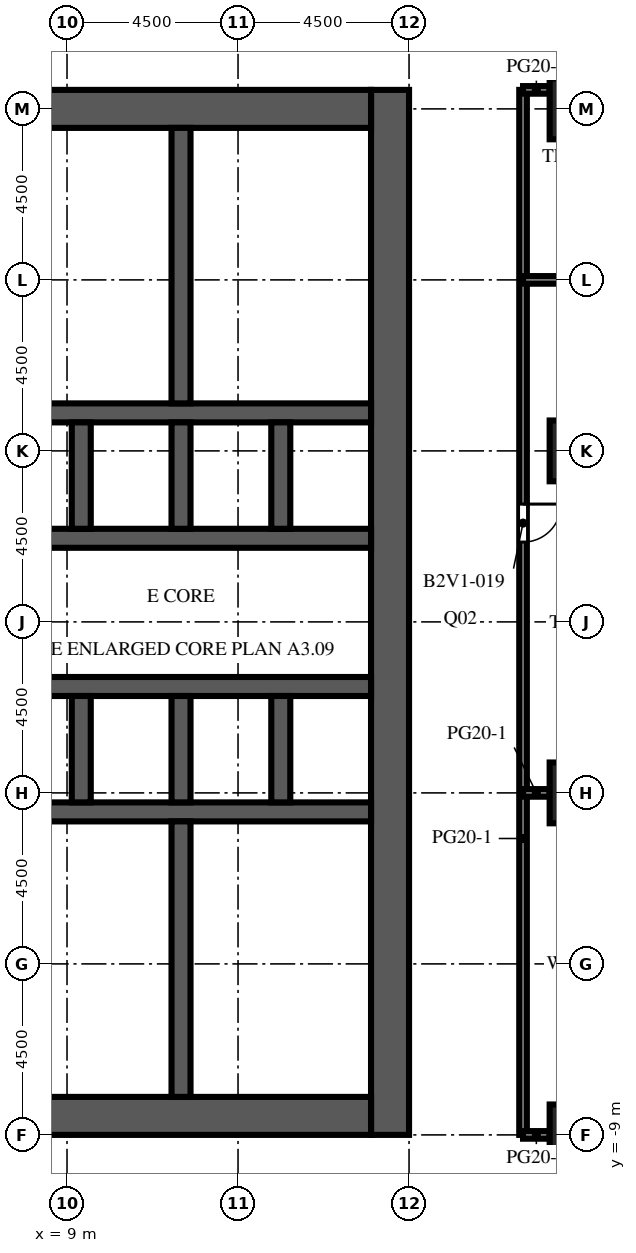
"""IFC4 building model, lengths in metres.
Left out: names, types, materials, properties, quantities, classifications, styles, units other than length and angle.
Written with IfcOpenShell. Run it as: python <this file> out.ifc"""

import sys

from ifc_helpers import new_model, si_unit, direction, frame, frame_2d, origin, origin_2d, place, context, subcontext, project, spatial, rectangle, extrude, element, fill, save


model = new_model("IFC4")
c1 = context("Model", 3, precision=1e-05, world=origin(), true_north=direction((0.0, 1.0)))
c2 = subcontext(c1, "Body", "Model", "MODEL_VIEW")
j1 = project(units=[si_unit("LENGTHUNIT", "METRE"), si_unit("PLANEANGLEUNIT", "RADIAN")], contexts=[c1])
p1 = place(None, origin())
s1 = spatial("IfcSite", under=j1, at=p1, CompositionType="ELEMENT")
p2 = place(p1, origin())
s2 = spatial("IfcBuilding", under=s1, at=p2, CompositionType="ELEMENT")
p3 = place(p2, frame((0.0, 0.0, 46.0)))
s3 = spatial("IfcBuildingStorey", under=s2, at=p3, CompositionType="ELEMENT", Elevation=46.0)
for number, where, z_axis, x_axis in (
    (1, (22.5, -9.0, 0.0), (0.0, 0.0, 1.0), (1.0, 0.0, 0.0)),
    (2, (22.5, 0.0, 0.0), (0.0, 0.0, 1.0), (1.0, 0.0, 0.0)),
    (3, (22.5, 9.0, 0.0), (0.0, 0.0, 1.0), (1.0, 0.0, 0.0)),
    (4, (22.5, 18.0, 0.0), (0.0, 0.0, 1.0), (1.0, 0.0, 0.0)),
):
    element("IfcColumn", number, at=place(p3, frame(where, z_axis=z_axis, x_axis=x_axis)), inside=s3, PredefinedType="COLUMN", context=c2, shape_type="SweptSolid", body=[
        extrude(rectangle(XDim=1.6, YDim=1.6, at=origin_2d()), origin(), (0.0, 0.0, 1.0), 4.1),
    ])
p4 = place(p3, frame((17.5, -9.0, 0.0), z_axis=(0.0, 0.0, 1.0), x_axis=(0.0, 1.0, 0.0)))
e5 = element("IfcWall", 5, at=p4, inside=s3, PredefinedType="SHEAR", context=c2, shape_type="SweptSolid", body=[
    extrude(rectangle(XDim=27.5, YDim=1.0, at=frame_2d((13.75, 0.0))), origin(), (0.0, 0.0, 1.0), 4.1),
])
p5 = place(p4, frame((12.55, 0.0, 0.0)))
e6 = element("IfcOpeningElement", 6, at=p5, cuts=e5, PredefinedType="OPENING", context=c2, shape_type="SweptSolid", body=[
    extrude(rectangle(XDim=2.4, YDim=2.4, at=frame_2d((1.2, 1.2))), frame((0.0, 0.51, 0.0), z_axis=(0.0, -1.0, 0.0), x_axis=(1.0, 0.0, 0.0)), (0.0, 0.0, 1.0), 1.02),
])
p6 = place(p4, frame((6.825, 0.0, 0.0)))
e7 = element("IfcOpeningElement", 7, at=p6, cuts=e5, PredefinedType="OPENING", context=c2, shape_type="SweptSolid", body=[
    extrude(rectangle(XDim=1.2, YDim=2.1, at=frame_2d((0.6, 1.05))), frame((0.0, 0.51, 0.0), z_axis=(0.0, -1.0, 0.0), x_axis=(1.0, 0.0, 0.0)), (0.0, 0.0, 1.0), 1.02),
])
p7 = place(p4, frame((19.475, 0.0, 0.0)))
e8 = element("IfcOpeningElement", 8, at=p7, cuts=e5, PredefinedType="OPENING", context=c2, shape_type="SweptSolid", body=[
    extrude(rectangle(XDim=1.2, YDim=2.1, at=frame_2d((0.6, 1.05))), frame((0.0, 0.51, 0.0), z_axis=(0.0, -1.0, 0.0), x_axis=(1.0, 0.0, 0.0)), (0.0, 0.0, 1.0), 1.02),
])
for number, where, z_axis, x_axis in (
    (9, (7.0, -8.5, 0.0), (0.0, 0.0, 1.0), (1.0, 0.0, 0.0)),
    (10, (7.0, 18.0, 0.0), (0.0, 0.0, 1.0), (1.0, 0.0, 0.0)),
):
    element("IfcWall", number, at=place(p3, frame(where, z_axis=z_axis, x_axis=x_axis)), inside=s3, PredefinedType="SHEAR", context=c2, shape_type="SweptSolid", body=[
        extrude(rectangle(XDim=10.0, YDim=1.0, at=frame_2d((5.0, 0.0))), origin(), (0.0, 0.0, 1.0), 4.1),
    ])
p8 = place(p3, frame((7.0, -0.5, 0.0), z_axis=(0.0, 0.0, 1.0), x_axis=(1.0, 0.0, 0.0)))
e11 = element("IfcWall", 11, at=p8, inside=s3, PredefinedType="SHEAR", context=c2, shape_type="SweptSolid", body=[
    extrude(rectangle(XDim=10.0, YDim=0.5, at=frame_2d((5.0, 0.0))), origin(), (0.0, 0.0, 1.0), 4.1),
])
p9 = place(p3, frame((7.0, 2.8, 0.0), z_axis=(0.0, 0.0, 1.0), x_axis=(1.0, 0.0, 0.0)))
e12 = element("IfcWall", 12, at=p9, inside=s3, PredefinedType="SHEAR", context=c2, shape_type="SweptSolid", body=[
    extrude(rectangle(XDim=10.0, YDim=0.5, at=frame_2d((5.0, 0.0))), origin(), (0.0, 0.0, 1.0), 4.1),
])
p10 = place(p9, frame((0.512, 0.0, 0.0)))
e13 = element("IfcOpeningElement", 13, at=p10, cuts=e12, PredefinedType="OPENING", context=c2, shape_type="SweptSolid", body=[
    extrude(rectangle(XDim=1.1, YDim=2.1, at=frame_2d((0.55, 1.05))), frame((0.0, 0.26, 0.0), z_axis=(0.0, -1.0, 0.0), x_axis=(1.0, 0.0, 0.0)), (0.0, 0.0, 1.0), 0.52),
])
p11 = place(p9, frame((3.137, 0.0, 0.0)))
e14 = element("IfcOpeningElement", 14, at=p11, cuts=e12, PredefinedType="OPENING", context=c2, shape_type="SweptSolid", body=[
    extrude(rectangle(XDim=1.1, YDim=2.1, at=frame_2d((0.55, 1.05))), frame((0.0, 0.26, 0.0), z_axis=(0.0, -1.0, 0.0), x_axis=(1.0, 0.0, 0.0)), (0.0, 0.0, 1.0), 0.52),
])
p12 = place(p9, frame((8.387, 0.0, 0.0)))
e15 = element("IfcOpeningElement", 15, at=p12, cuts=e12, PredefinedType="OPENING", context=c2, shape_type="SweptSolid", body=[
    extrude(rectangle(XDim=1.1, YDim=2.1, at=frame_2d((0.55, 1.05))), frame((0.0, 0.26, 0.0), z_axis=(0.0, -1.0, 0.0), x_axis=(1.0, 0.0, 0.0)), (0.0, 0.0, 1.0), 0.52),
])
p13 = place(p3, frame((7.0, 6.7, 0.0), z_axis=(0.0, 0.0, 1.0), x_axis=(1.0, 0.0, 0.0)))
e16 = element("IfcWall", 16, at=p13, inside=s3, PredefinedType="SHEAR", context=c2, shape_type="SweptSolid", body=[
    extrude(rectangle(XDim=10.0, YDim=0.5, at=frame_2d((5.0, 0.0))), origin(), (0.0, 0.0, 1.0), 4.1),
])
p14 = place(p13, frame((0.512, 0.0, 0.0)))
e17 = element("IfcOpeningElement", 17, at=p14, cuts=e16, PredefinedType="OPENING", context=c2, shape_type="SweptSolid", body=[
    extrude(rectangle(XDim=1.1, YDim=2.1, at=frame_2d((0.55, 1.05))), frame((0.0, 0.26, 0.0), z_axis=(0.0, -1.0, 0.0), x_axis=(1.0, 0.0, 0.0)), (0.0, 0.0, 1.0), 0.52),
])
p15 = place(p13, frame((3.188, 0.0, 0.0)))
e18 = element("IfcOpeningElement", 18, at=p15, cuts=e16, PredefinedType="OPENING", context=c2, shape_type="SweptSolid", body=[
    extrude(rectangle(XDim=1.0, YDim=2.1, at=frame_2d((0.5, 1.05))), frame((0.0, 0.26, 0.0), z_axis=(0.0, -1.0, 0.0), x_axis=(1.0, 0.0, 0.0)), (0.0, 0.0, 1.0), 0.52),
])
p16 = place(p13, frame((5.812, 0.0, 0.0)))
e19 = element("IfcOpeningElement", 19, at=p16, cuts=e16, PredefinedType="OPENING", context=c2, shape_type="SweptSolid", body=[
    extrude(rectangle(XDim=1.0, YDim=2.1, at=frame_2d((0.5, 1.05))), frame((0.0, 0.26, 0.0), z_axis=(0.0, -1.0, 0.0), x_axis=(1.0, 0.0, 0.0)), (0.0, 0.0, 1.0), 0.52),
])
p17 = place(p13, frame((8.438, 0.0, 0.0)))
e20 = element("IfcOpeningElement", 20, at=p17, cuts=e16, PredefinedType="OPENING", context=c2, shape_type="SweptSolid", body=[
    extrude(rectangle(XDim=1.0, YDim=2.1, at=frame_2d((0.5, 1.05))), frame((0.0, 0.26, 0.0), z_axis=(0.0, -1.0, 0.0), x_axis=(1.0, 0.0, 0.0)), (0.0, 0.0, 1.0), 0.52),
])
p18 = place(p3, frame((7.0, 10.0, 0.0), z_axis=(0.0, 0.0, 1.0), x_axis=(1.0, 0.0, 0.0)))
e21 = element("IfcWall", 21, at=p18, inside=s3, PredefinedType="SHEAR", context=c2, shape_type="SweptSolid", body=[
    extrude(rectangle(XDim=10.0, YDim=0.5, at=frame_2d((5.0, 0.0))), origin(), (0.0, 0.0, 1.0), 4.1),
])
for number, where, z_axis, x_axis in (
    (22, (9.375, -0.25, 0.0), (0.0, 0.0, 1.0), (0.0, 1.0, 0.0)),
    (23, (9.375, 6.95, 0.0), (0.0, 0.0, 1.0), (0.0, 1.0, 0.0)),
    (24, (12.0, -0.25, 0.0), (0.0, 0.0, 1.0), (0.0, 1.0, 0.0)),
    (25, (12.0, 6.95, 0.0), (0.0, 0.0, 1.0), (0.0, 1.0, 0.0)),
    (26, (14.625, -0.25, 0.0), (0.0, 0.0, 1.0), (0.0, 1.0, 0.0)),
    (27, (14.625, 6.95, 0.0), (0.0, 0.0, 1.0), (0.0, 1.0, 0.0)),
):
    element("IfcWall", number, at=place(p3, frame(where, z_axis=z_axis, x_axis=x_axis)), inside=s3, PredefinedType="SHEAR", context=c2, shape_type="SweptSolid", body=[
        extrude(rectangle(XDim=2.8, YDim=0.5, at=frame_2d((1.4, 0.0))), origin(), (0.0, 0.0, 1.0), 4.1),
    ])
for number, where, z_axis, x_axis in (
    (28, (12.0, -8.0, 0.0), (0.0, 0.0, 1.0), (0.0, 1.0, 0.0)),
    (29, (12.0, 10.25, 0.0), (0.0, 0.0, 1.0), (0.0, 1.0, 0.0)),
):
    element("IfcWall", number, at=place(p3, frame(where, z_axis=z_axis, x_axis=x_axis)), inside=s3, PredefinedType="SHEAR", context=c2, shape_type="SweptSolid", body=[
        extrude(rectangle(XDim=7.25, YDim=0.5, at=frame_2d((3.625, 0.0))), origin(), (0.0, 0.0, 1.0), 4.1),
    ])
for number, where, z_axis, x_axis in (
    (30, (8.5, -5.825, 0.0), (0.0, 0.0, 1.0), (1.0, 0.0, 0.0)),
    (31, (8.5, -3.65, 0.0), (0.0, 0.0, 1.0), (1.0, 0.0, 0.0)),
    (32, (8.5, -2.055, 0.0), (0.0, 0.0, 1.0), (1.0, 0.0, 0.0)),
):
    element("IfcWall", number, at=place(p3, frame(where, z_axis=z_axis, x_axis=x_axis)), inside=s3, PredefinedType="PARTITIONING", context=c2, shape_type="SweptSolid", body=[
        extrude(rectangle(XDim=3.25, YDim=0.1, at=frame_2d((1.625, 0.0))), origin(), (0.0, 0.0, 1.0), 3.65),
    ])
for number, where, z_axis, x_axis in (
    (33, (8.4, 12.425, 0.0), (0.0, 0.0, 1.0), (1.0, 0.0, 0.0)),
    (34, (8.4, 14.745, 0.0), (0.0, 0.0, 1.0), (1.0, 0.0, 0.0)),
):
    element("IfcWall", number, at=place(p3, frame(where, z_axis=z_axis, x_axis=x_axis)), inside=s3, PredefinedType="PARTITIONING", context=c2, shape_type="SweptSolid", body=[
        extrude(rectangle(XDim=3.35, YDim=0.1, at=frame_2d((1.675, 0.0))), origin(), (0.0, 0.0, 1.0), 3.65),
    ])
p19 = place(p3, frame((21.0, 18.5, 0.0), z_axis=(0.0, 0.0, 1.0), x_axis=(0.0, -1.0, 0.0)))
e35 = element("IfcWall", 35, at=p19, inside=s3, PredefinedType="PARTITIONING", context=c2, shape_type="SweptSolid", body=[
    extrude(rectangle(XDim=27.5, YDim=0.2, at=frame_2d((13.75, 0.0))), origin(), (0.0, 0.0, 1.0), 3.65),
])
p20 = place(p19, frame((10.9, 0.0, 0.0)))
e36 = element("IfcOpeningElement", 36, at=p20, cuts=e35, PredefinedType="OPENING", context=c2, shape_type="SweptSolid", body=[
    extrude(rectangle(XDim=1.0, YDim=2.1, at=frame_2d((0.5, 1.05))), frame((0.0, 0.11, 0.0), z_axis=(0.0, -1.0, 0.0), x_axis=(1.0, 0.0, 0.0)), (0.0, 0.0, 1.0), 0.22),
])
for number, where, z_axis, x_axis in (
    (37, (21.0, -9.0, 0.0), (0.0, 0.0, 1.0), (1.0, 0.0, 0.0)),
    (38, (21.0, 0.0, 0.0), (0.0, 0.0, 1.0), (1.0, 0.0, 0.0)),
):
    element("IfcWall", number, at=place(p3, frame(where, z_axis=z_axis, x_axis=x_axis)), inside=s3, PredefinedType="PARTITIONING", context=c2, shape_type="SweptSolid", body=[
        extrude(rectangle(XDim=0.7, YDim=0.2, at=frame_2d((0.35, 0.0))), origin(), (0.0, 0.0, 1.0), 3.65),
    ])
p21 = place(p3, frame((21.0, 13.5, 0.0), z_axis=(0.0, 0.0, 1.0), x_axis=(1.0, 0.0, 0.0)))
e39 = element("IfcWall", 39, at=p21, inside=s3, PredefinedType="PARTITIONING", context=c2, shape_type="SweptSolid", body=[
    extrude(rectangle(XDim=9.8, YDim=0.2, at=frame_2d((4.9, 0.0))), origin(), (0.0, 0.0, 1.0), 3.65),
])
p22 = place(p3, frame((21.0, 18.5, 0.0), z_axis=(0.0, 0.0, 1.0), x_axis=(1.0, 0.0, 0.0)))
e40 = element("IfcWall", 40, at=p22, inside=s3, PredefinedType="PARTITIONING", context=c2, shape_type="SweptSolid", body=[
    extrude(rectangle(XDim=0.7, YDim=0.2, at=frame_2d((0.35, 0.0))), origin(), (0.0, 0.0, 1.0), 3.65),
])
p23 = place(p11, origin())
e41 = element("IfcDoor", 41, at=p23, inside=s3, OperationType="DOUBLE_DOOR_SLIDING", PredefinedType="DOOR", context=c2, shape_type="SweptSolid", body=[
    extrude(rectangle(XDim=1.1, YDim=2.1, at=frame_2d((0.55, 1.05))), frame((0.0, 0.025, 0.0), z_axis=(0.0, -1.0, 0.0), x_axis=(1.0, 0.0, 0.0)), (0.0, 0.0, 1.0), 0.05),
])
fill(e14, e41)
p24 = place(p12, origin())
e42 = element("IfcDoor", 42, at=p24, inside=s3, OperationType="DOUBLE_DOOR_SLIDING", PredefinedType="DOOR", context=c2, shape_type="SweptSolid", body=[
    extrude(rectangle(XDim=1.1, YDim=2.1, at=frame_2d((0.55, 1.05))), frame((0.0, 0.025, 0.0), z_axis=(0.0, -1.0, 0.0), x_axis=(1.0, 0.0, 0.0)), (0.0, 0.0, 1.0), 0.05),
])
fill(e15, e42)
p25 = place(p5, origin())
e43 = element("IfcDoor", 43, at=p25, inside=s3, OperationType="DOUBLE_DOOR_DOUBLE_SWING", PredefinedType="DOOR", context=c2, shape_type="SweptSolid", body=[
    extrude(rectangle(XDim=2.4, YDim=2.4, at=frame_2d((1.2, 1.2))), frame((0.0, 0.025, 0.0), z_axis=(0.0, -1.0, 0.0), x_axis=(1.0, 0.0, 0.0)), (0.0, 0.0, 1.0), 0.05),
])
fill(e6, e43)
p26 = place(p6, frame((1.2, 0.0, 0.0), z_axis=(0.0, 0.0, 1.0), x_axis=(-1.0, 0.0, 0.0)))
e44 = element("IfcDoor", 44, at=p26, inside=s3, OperationType="SINGLE_SWING_LEFT", PredefinedType="DOOR", context=c2, shape_type="SweptSolid", body=[
    extrude(rectangle(XDim=1.2, YDim=2.1, at=frame_2d((0.6, 1.05))), frame((0.0, 0.025, 0.0), z_axis=(0.0, -1.0, 0.0), x_axis=(1.0, 0.0, 0.0)), (0.0, 0.0, 1.0), 0.05),
])
fill(e7, e44)
p27 = place(p7, frame((1.2, 0.0, 0.0), z_axis=(0.0, 0.0, 1.0), x_axis=(-1.0, 0.0, 0.0)))
e45 = element("IfcDoor", 45, at=p27, inside=s3, OperationType="SINGLE_SWING_LEFT", PredefinedType="DOOR", context=c2, shape_type="SweptSolid", body=[
    extrude(rectangle(XDim=1.2, YDim=2.1, at=frame_2d((0.6, 1.05))), frame((0.0, 0.025, 0.0), z_axis=(0.0, -1.0, 0.0), x_axis=(1.0, 0.0, 0.0)), (0.0, 0.0, 1.0), 0.05),
])
fill(e8, e45)
p28 = place(p15, origin())
e46 = element("IfcDoor", 46, at=p28, inside=s3, OperationType="SINGLE_SWING_RIGHT", PredefinedType="DOOR", context=c2, shape_type="SweptSolid", body=[
    extrude(rectangle(XDim=1.0, YDim=2.1, at=frame_2d((0.5, 1.05))), frame((0.0, 0.025, 0.0), z_axis=(0.0, -1.0, 0.0), x_axis=(1.0, 0.0, 0.0)), (0.0, 0.0, 1.0), 0.05),
])
fill(e18, e46)
p29 = place(p16, origin())
e47 = element("IfcDoor", 47, at=p29, inside=s3, OperationType="SINGLE_SWING_LEFT", PredefinedType="DOOR", context=c2, shape_type="SweptSolid", body=[
    extrude(rectangle(XDim=1.0, YDim=2.1, at=frame_2d((0.5, 1.05))), frame((0.0, 0.025, 0.0), z_axis=(0.0, -1.0, 0.0), x_axis=(1.0, 0.0, 0.0)), (0.0, 0.0, 1.0), 0.05),
])
fill(e19, e47)
p30 = place(p17, origin())
e48 = element("IfcDoor", 48, at=p30, inside=s3, OperationType="SINGLE_SWING_RIGHT", PredefinedType="DOOR", context=c2, shape_type="SweptSolid", body=[
    extrude(rectangle(XDim=1.0, YDim=2.1, at=frame_2d((0.5, 1.05))), frame((0.0, 0.025, 0.0), z_axis=(0.0, -1.0, 0.0), x_axis=(1.0, 0.0, 0.0)), (0.0, 0.0, 1.0), 0.05),
])
fill(e20, e48)
p31 = place(p20, origin())
e49 = element("IfcDoor", 49, at=p31, inside=s3, OperationType="SINGLE_SWING_LEFT", PredefinedType="DOOR", context=c2, shape_type="SweptSolid", body=[
    extrude(rectangle(XDim=1.0, YDim=2.1, at=frame_2d((0.5, 1.05))), frame((0.0, 0.025, 0.0), z_axis=(0.0, -1.0, 0.0), x_axis=(1.0, 0.0, 0.0)), (0.0, 0.0, 1.0), 0.05),
])
fill(e36, e49)
save(model, sys.argv[1])
